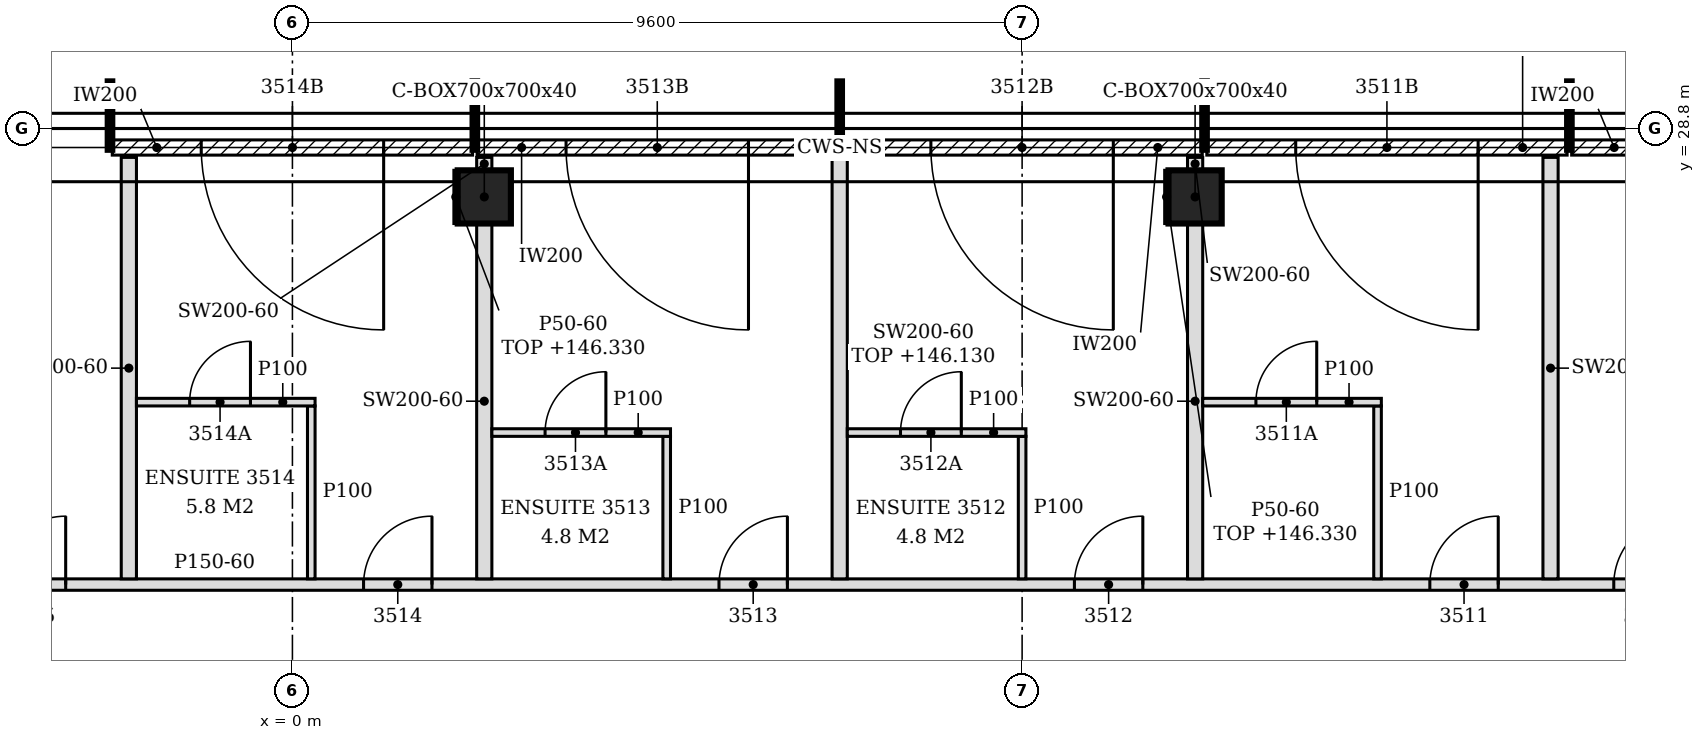
"""IFC4 building model, lengths in metres.
Left out: names, types, materials, properties, quantities, classifications, styles, units other than length and angle.
Written with IfcOpenShell. Run it as: python <this file> out.ifc"""

import sys

from ifc_helpers import new_model, si_unit, direction, frame, frame_2d, origin, origin_2d, place, context, subcontext, project, spatial, polyline, rectangle, hollow_rectangle, outline, extrude, element, fill, save


model = new_model("IFC4")
c1 = context("Model", 3, precision=1e-05, world=origin(), true_north=direction((0.0, 1.0)))
c2 = subcontext(c1, "Body", "Model", "MODEL_VIEW")
j1 = project(units=[si_unit("LENGTHUNIT", "METRE"), si_unit("PLANEANGLEUNIT", "RADIAN")], contexts=[c1])
p1 = place(None, origin())
s1 = spatial("IfcSite", under=j1, at=p1, CompositionType="ELEMENT")
p2 = place(p1, origin())
s2 = spatial("IfcBuilding", under=s1, at=p2, CompositionType="ELEMENT")
p3 = place(p2, frame((0.0, 0.0, 143.4)))
s3 = spatial("IfcBuildingStorey", under=s2, at=p3, CompositionType="ELEMENT", Elevation=143.4)
for number, where, z_axis, x_axis in (
    (1, (11.876, 27.9, -0.15), (0.0, 0.0, 1.0), (1.0, 0.0, 0.0)),
    (2, (2.524, 27.9, -0.15), (0.0, 0.0, 1.0), (1.0, 0.0, 0.0)),
):
    element("IfcColumn", number, at=place(p3, frame(where, z_axis=z_axis, x_axis=x_axis)), inside=s3, PredefinedType="COLUMN", context=c2, shape_type="SweptSolid", body=[
        extrude(hollow_rectangle(XDim=0.7, YDim=0.7, WallThickness=0.04, at=origin_2d()), origin(), (0.0, 0.0, 1.0), 3.6),
    ])
p4 = place(p3, frame((21.457, 28.55, 0.0), z_axis=(0.0, 0.0, 1.0), x_axis=(-1.0, 0.0, 0.0)))
e3 = element("IfcWall", 3, at=p4, inside=s3, PredefinedType="NOTDEFINED", context=c2, shape_type="SweptSolid", body=[
    extrude(rectangle(XDim=4.626, YDim=0.2, at=frame_2d((2.313, 0.0))), origin(), (0.0, 0.0, 1.0), 3.45),
])
p5 = place(p4, frame((1.108, 0.0, 0.0)))
e4 = element("IfcOpeningElement", 4, at=p5, cuts=e3, PredefinedType="OPENING", context=c2, shape_type="SweptSolid", body=[
    extrude(rectangle(XDim=2.4, YDim=2.4, at=frame_2d((1.2, 1.2))), frame((0.0, 0.11, 0.0), z_axis=(0.0, -1.0, 0.0), x_axis=(1.0, 0.0, 0.0)), (0.0, 0.0, 1.0), 0.22),
])
p6 = place(p3, frame((16.77, 28.55, 0.0), z_axis=(0.0, 0.0, 1.0), x_axis=(-1.0, 0.0, 0.0)))
e5 = element("IfcWall", 5, at=p6, inside=s3, PredefinedType="NOTDEFINED", context=c2, shape_type="SweptSolid", body=[
    extrude(rectangle(XDim=4.74, YDim=0.2, at=frame_2d((2.37, 0.0))), origin(), (0.0, 0.0, 1.0), 3.45),
])
p7 = place(p6, frame((1.17, 0.0, 0.0)))
e6 = element("IfcOpeningElement", 6, at=p7, cuts=e5, PredefinedType="OPENING", context=c2, shape_type="SweptSolid", body=[
    extrude(rectangle(XDim=2.4, YDim=2.4, at=frame_2d((1.2, 1.2))), frame((0.0, 0.11, 0.0), z_axis=(0.0, -1.0, 0.0), x_axis=(1.0, 0.0, 0.0)), (0.0, 0.0, 1.0), 0.22),
])
p8 = place(p3, frame((11.97, 28.55, 0.0), z_axis=(0.0, 0.0, 1.0), x_axis=(-1.0, 0.0, 0.0)))
e7 = element("IfcWall", 7, at=p8, inside=s3, PredefinedType="NOTDEFINED", context=c2, shape_type="SweptSolid", body=[
    extrude(rectangle(XDim=4.74, YDim=0.2, at=frame_2d((2.37, 0.0))), origin(), (0.0, 0.0, 1.0), 3.45),
])
p9 = place(p8, frame((1.17, 0.0, 0.0)))
e8 = element("IfcOpeningElement", 8, at=p9, cuts=e7, PredefinedType="OPENING", context=c2, shape_type="SweptSolid", body=[
    extrude(rectangle(XDim=2.4, YDim=2.4, at=frame_2d((1.2, 1.2))), frame((0.0, 0.11, 0.0), z_axis=(0.0, -1.0, 0.0), x_axis=(1.0, 0.0, 0.0)), (0.0, 0.0, 1.0), 0.22),
])
p10 = place(p3, frame((7.17, 28.55, 0.0), z_axis=(0.0, 0.0, 1.0), x_axis=(-1.0, 0.0, 0.0)))
e9 = element("IfcWall", 9, at=p10, inside=s3, PredefinedType="NOTDEFINED", context=c2, shape_type="SweptSolid", body=[
    extrude(rectangle(XDim=4.74, YDim=0.2, at=frame_2d((2.37, 0.0))), origin(), (0.0, 0.0, 1.0), 3.45),
])
p11 = place(p10, frame((1.17, 0.0, 0.0)))
e10 = element("IfcOpeningElement", 10, at=p11, cuts=e9, PredefinedType="OPENING", context=c2, shape_type="SweptSolid", body=[
    extrude(rectangle(XDim=2.4, YDim=2.4, at=frame_2d((1.2, 1.2))), frame((0.0, 0.11, 0.0), z_axis=(0.0, -1.0, 0.0), x_axis=(1.0, 0.0, 0.0)), (0.0, 0.0, 1.0), 0.22),
])
p12 = place(p3, frame((2.37, 28.55, 0.0), z_axis=(0.0, 0.0, 1.0), x_axis=(-1.0, 0.0, 0.0)))
e11 = element("IfcWall", 11, at=p12, inside=s3, PredefinedType="NOTDEFINED", context=c2, shape_type="SweptSolid", body=[
    extrude(rectangle(XDim=4.74, YDim=0.2, at=frame_2d((2.37, 0.0))), origin(), (0.0, 0.0, 1.0), 3.45),
])
p13 = place(p12, frame((1.17, 0.0, 0.0)))
e12 = element("IfcOpeningElement", 12, at=p13, cuts=e11, PredefinedType="OPENING", context=c2, shape_type="SweptSolid", body=[
    extrude(rectangle(XDim=2.4, YDim=2.4, at=frame_2d((1.2, 1.2))), frame((0.0, 0.11, 0.0), z_axis=(0.0, -1.0, 0.0), x_axis=(1.0, 0.0, 0.0)), (0.0, 0.0, 1.0), 0.22),
])
p14 = place(p3, frame((-4.821, 22.8, 0.0), z_axis=(0.0, 0.0, 1.0), x_axis=(1.0, 0.0, 0.0)))
e13 = element("IfcWall", 13, at=p14, inside=s3, PredefinedType="PARTITIONING", context=c2, shape_type="SweptSolid", body=[
    extrude(outline(polyline([(0.0, 0.0), (24.042, 0.0), (24.042, 2.73), (23.871, 2.73), (23.869, 3.45), (12.171, 3.45), (12.169, 2.73), (11.871, 2.73), (11.869, 3.45), (0.171, 3.45), (0.169, 2.73), (0.0, 2.73), (0.0, 0.0)])), frame((0.0, 0.075, 0.0), z_axis=(0.0, -1.0, 0.0), x_axis=(1.0, 0.0, 0.0)), (0.0, 0.0, 1.0), 0.15),
])
p15 = place(p14, frame((22.205, 0.0, 0.0)))
e14 = element("IfcOpeningElement", 14, at=p15, cuts=e13, PredefinedType="OPENING", context=c2, shape_type="SweptSolid", body=[
    extrude(rectangle(XDim=0.9, YDim=2.1, at=frame_2d((0.45, 1.05))), frame((0.0, 0.085, 0.0), z_axis=(0.0, -1.0, 0.0), x_axis=(1.0, 0.0, 0.0)), (0.0, 0.0, 1.0), 0.17),
])
p16 = place(p14, frame((19.785, 0.0, 0.0)))
e15 = element("IfcOpeningElement", 15, at=p16, cuts=e13, PredefinedType="OPENING", context=c2, shape_type="SweptSolid", body=[
    extrude(rectangle(XDim=0.9, YDim=2.1, at=frame_2d((0.45, 1.05))), frame((0.0, 0.085, 0.0), z_axis=(0.0, -1.0, 0.0), x_axis=(1.0, 0.0, 0.0)), (0.0, 0.0, 1.0), 0.17),
])
p17 = place(p14, frame((15.109, 0.0, 0.0)))
e16 = element("IfcOpeningElement", 16, at=p17, cuts=e13, PredefinedType="OPENING", context=c2, shape_type="SweptSolid", body=[
    extrude(rectangle(XDim=0.9, YDim=2.1, at=frame_2d((0.45, 1.05))), frame((0.0, 0.085, 0.0), z_axis=(0.0, -1.0, 0.0), x_axis=(1.0, 0.0, 0.0)), (0.0, 0.0, 1.0), 0.17),
])
p18 = place(p14, frame((10.433, 0.0, 0.0)))
e17 = element("IfcOpeningElement", 17, at=p18, cuts=e13, PredefinedType="OPENING", context=c2, shape_type="SweptSolid", body=[
    extrude(rectangle(XDim=0.9, YDim=2.1, at=frame_2d((0.45, 1.05))), frame((0.0, 0.085, 0.0), z_axis=(0.0, -1.0, 0.0), x_axis=(1.0, 0.0, 0.0)), (0.0, 0.0, 1.0), 0.17),
])
p19 = place(p14, frame((5.757, 0.0, 0.0)))
e18 = element("IfcOpeningElement", 18, at=p19, cuts=e13, PredefinedType="OPENING", context=c2, shape_type="SweptSolid", body=[
    extrude(rectangle(XDim=0.9, YDim=2.1, at=frame_2d((0.45, 1.05))), frame((0.0, 0.085, 0.0), z_axis=(0.0, -1.0, 0.0), x_axis=(1.0, 0.0, 0.0)), (0.0, 0.0, 1.0), 0.17),
])
p20 = place(p14, frame((0.938, 0.0, 0.0)))
e19 = element("IfcOpeningElement", 19, at=p20, cuts=e13, PredefinedType="OPENING", context=c2, shape_type="SweptSolid", body=[
    extrude(rectangle(XDim=0.9, YDim=2.1, at=frame_2d((0.45, 1.05))), frame((0.0, 0.085, 0.0), z_axis=(0.0, -1.0, 0.0), x_axis=(1.0, 0.0, 0.0)), (0.0, 0.0, 1.0), 0.17),
])
p21 = place(p3, frame((-2.152, 22.875, 0.0), z_axis=(0.0, 0.0, 1.0), x_axis=(0.0, 1.0, 0.0)))
e20 = element("IfcWall", 20, at=p21, inside=s3, PredefinedType="PARTITIONING", context=c2, shape_type="SweptSolid", body=[
    extrude(outline(polyline([(0.0, 0.0), (5.545, 0.0), (5.545, 3.45), (5.175, 3.45), (5.173, 2.93), (4.875, 2.93), (4.873, 3.45), (1.23, 3.45), (1.228, 2.88), (1.02, 2.88), (1.018, 3.45), (0.0, 3.45), (0.0, 0.0)])), frame((0.0, 0.1, 0.0), z_axis=(0.0, -1.0, 0.0), x_axis=(1.0, 0.0, 0.0)), (0.0, 0.0, 1.0), 0.2),
])
p22 = place(p3, frame((0.248, 22.875, 0.0), z_axis=(0.0, 0.0, 1.0), x_axis=(0.0, 1.0, 0.0)))
e21 = element("IfcWall", 21, at=p22, inside=s3, PredefinedType="PARTITIONING", context=c2, shape_type="SweptSolid", body=[
    extrude(outline(polyline([(0.0, 0.0), (2.275, 0.0), (2.275, 3.45), (1.23, 3.45), (1.228, 2.88), (1.02, 2.88), (1.018, 3.45), (0.0, 3.45), (0.0, 0.0)])), frame((0.0, 0.05, 0.0), z_axis=(0.0, -1.0, 0.0), x_axis=(1.0, 0.0, 0.0)), (0.0, 0.0, 1.0), 0.1),
])
p23 = place(p3, frame((2.524, 22.875, 0.0), z_axis=(0.0, 0.0, 1.0), x_axis=(0.0, 1.0, 0.0)))
e22 = element("IfcWall", 22, at=p23, inside=s3, PredefinedType="PARTITIONING", context=c2, shape_type="SweptSolid", body=[
    extrude(outline(polyline([(0.0, 0.0), (4.675, 0.0), (4.675, 3.45), (1.23, 3.45), (1.228, 2.88), (1.02, 2.88), (1.018, 3.45), (0.0, 3.45), (0.0, 0.0)])), frame((0.0, 0.1, 0.0), z_axis=(0.0, -1.0, 0.0), x_axis=(1.0, 0.0, 0.0)), (0.0, 0.0, 1.0), 0.2),
])
p24 = place(p3, frame((4.924, 22.875, 0.0), z_axis=(0.0, 0.0, 1.0), x_axis=(0.0, 1.0, 0.0)))
e23 = element("IfcWall", 23, at=p24, inside=s3, PredefinedType="PARTITIONING", context=c2, shape_type="SweptSolid", body=[
    extrude(outline(polyline([(0.0, 0.0), (1.875, 0.0), (1.875, 3.45), (1.23, 3.45), (1.228, 2.88), (1.02, 2.88), (1.018, 3.45), (0.0, 3.45), (0.0, 0.0)])), frame((0.0, 0.05, 0.0), z_axis=(0.0, -1.0, 0.0), x_axis=(1.0, 0.0, 0.0)), (0.0, 0.0, 1.0), 0.1),
])
p25 = place(p3, frame((7.2, 22.875, 0.0), z_axis=(0.0, 0.0, 1.0), x_axis=(0.0, 1.0, 0.0)))
e24 = element("IfcWall", 24, at=p25, inside=s3, PredefinedType="PARTITIONING", context=c2, shape_type="SweptSolid", body=[
    extrude(rectangle(XDim=5.575, YDim=0.2, at=frame_2d((2.788, 0.0))), origin(), (0.0, 0.0, 1.0), 2.73),
])
p26 = place(p3, frame((9.6, 22.875, 0.0), z_axis=(0.0, 0.0, 1.0), x_axis=(0.0, 1.0, 0.0)))
e25 = element("IfcWall", 25, at=p26, inside=s3, PredefinedType="PARTITIONING", context=c2, shape_type="SweptSolid", body=[
    extrude(outline(polyline([(0.0, 0.0), (1.875, 0.0), (1.875, 3.45), (1.23, 3.45), (1.228, 2.88), (1.02, 2.88), (1.018, 3.45), (0.0, 3.45), (0.0, 0.0)])), frame((0.0, 0.05, 0.0), z_axis=(0.0, -1.0, 0.0), x_axis=(1.0, 0.0, 0.0)), (0.0, 0.0, 1.0), 0.1),
])
p27 = place(p3, frame((11.876, 22.875, 0.0), z_axis=(0.0, 0.0, 1.0), x_axis=(0.0, 1.0, 0.0)))
e26 = element("IfcWall", 26, at=p27, inside=s3, PredefinedType="PARTITIONING", context=c2, shape_type="SweptSolid", body=[
    extrude(outline(polyline([(0.0, 0.0), (4.675, 0.0), (4.675, 3.45), (1.23, 3.45), (1.228, 2.88), (1.02, 2.88), (1.018, 3.45), (0.0, 3.45), (0.0, 0.0)])), frame((0.0, 0.1, 0.0), z_axis=(0.0, -1.0, 0.0), x_axis=(1.0, 0.0, 0.0)), (0.0, 0.0, 1.0), 0.2),
])
p28 = place(p3, frame((14.276, 22.875, 0.0), z_axis=(0.0, 0.0, 1.0), x_axis=(0.0, 1.0, 0.0)))
e27 = element("IfcWall", 27, at=p28, inside=s3, PredefinedType="PARTITIONING", context=c2, shape_type="SweptSolid", body=[
    extrude(outline(polyline([(0.0, 0.0), (2.275, 0.0), (2.275, 3.45), (1.23, 3.45), (1.228, 2.88), (1.02, 2.88), (1.018, 3.45), (0.0, 3.45), (0.0, 0.0)])), frame((0.0, 0.05, 0.0), z_axis=(0.0, -1.0, 0.0), x_axis=(1.0, 0.0, 0.0)), (0.0, 0.0, 1.0), 0.1),
])
p29 = place(p3, frame((16.552, 22.875, 0.0), z_axis=(0.0, 0.0, 1.0), x_axis=(0.0, 1.0, 0.0)))
e28 = element("IfcWall", 28, at=p29, inside=s3, PredefinedType="PARTITIONING", context=c2, shape_type="SweptSolid", body=[
    extrude(outline(polyline([(0.0, 0.0), (5.545, 0.0), (5.545, 3.45), (5.175, 3.45), (5.173, 2.93), (4.875, 2.93), (4.873, 3.45), (1.23, 3.45), (1.228, 2.88), (1.02, 2.88), (1.018, 3.45), (0.0, 3.45), (0.0, 0.0)])), frame((0.0, 0.1, 0.0), z_axis=(0.0, -1.0, 0.0), x_axis=(1.0, 0.0, 0.0)), (0.0, 0.0, 1.0), 0.2),
])
p30 = place(p3, frame((2.624, 24.8, 0.0), z_axis=(0.0, 0.0, 1.0), x_axis=(1.0, 0.0, 0.0)))
e29 = element("IfcWall", 29, at=p30, inside=s3, PredefinedType="PARTITIONING", context=c2, shape_type="SweptSolid", body=[
    extrude(rectangle(XDim=2.35, YDim=0.1, at=frame_2d((1.175, 0.0))), origin(), (0.0, 0.0, 1.0), 3.45),
])
p31 = place(p30, frame((0.7, 0.0, 0.0)))
e30 = element("IfcOpeningElement", 30, at=p31, cuts=e29, PredefinedType="OPENING", context=c2, shape_type="SweptSolid", body=[
    extrude(rectangle(XDim=0.8, YDim=2.1, at=frame_2d((0.4, 1.05))), frame((0.0, 0.06, 0.0), z_axis=(0.0, -1.0, 0.0), x_axis=(1.0, 0.0, 0.0)), (0.0, 0.0, 1.0), 0.12),
])
p32 = place(p3, frame((7.3, 24.8, 0.0), z_axis=(0.0, 0.0, 1.0), x_axis=(1.0, 0.0, 0.0)))
e31 = element("IfcWall", 31, at=p32, inside=s3, PredefinedType="PARTITIONING", context=c2, shape_type="SweptSolid", body=[
    extrude(outline(polyline([(0.0, 0.0), (2.35, 0.0), (2.35, 3.45), (0.05, 3.45), (0.048, 2.73), (0.0, 2.73), (0.0, 0.0)])), frame((0.0, 0.05, 0.0), z_axis=(0.0, -1.0, 0.0), x_axis=(1.0, 0.0, 0.0)), (0.0, 0.0, 1.0), 0.1),
])
p33 = place(p32, frame((0.7, 0.0, 0.0)))
e32 = element("IfcOpeningElement", 32, at=p33, cuts=e31, PredefinedType="OPENING", context=c2, shape_type="SweptSolid", body=[
    extrude(rectangle(XDim=0.8, YDim=2.1, at=frame_2d((0.4, 1.05))), frame((0.0, 0.06, 0.0), z_axis=(0.0, -1.0, 0.0), x_axis=(1.0, 0.0, 0.0)), (0.0, 0.0, 1.0), 0.12),
])
p34 = place(p3, frame((-2.052, 25.2, 0.0), z_axis=(0.0, 0.0, 1.0), x_axis=(1.0, 0.0, 0.0)))
e33 = element("IfcWall", 33, at=p34, inside=s3, PredefinedType="PARTITIONING", context=c2, shape_type="SweptSolid", body=[
    extrude(rectangle(XDim=2.35, YDim=0.1, at=frame_2d((1.175, 0.0))), origin(), (0.0, 0.0, 1.0), 3.45),
])
p35 = place(p34, frame((0.7, 0.0, 0.0)))
e34 = element("IfcOpeningElement", 34, at=p35, cuts=e33, PredefinedType="OPENING", context=c2, shape_type="SweptSolid", body=[
    extrude(rectangle(XDim=0.8, YDim=2.1, at=frame_2d((0.4, 1.05))), frame((0.0, 0.06, 0.0), z_axis=(0.0, -1.0, 0.0), x_axis=(1.0, 0.0, 0.0)), (0.0, 0.0, 1.0), 0.12),
])
p36 = place(p3, frame((11.976, 25.2, 0.0), z_axis=(0.0, 0.0, 1.0), x_axis=(1.0, 0.0, 0.0)))
e35 = element("IfcWall", 35, at=p36, inside=s3, PredefinedType="PARTITIONING", context=c2, shape_type="SweptSolid", body=[
    extrude(rectangle(XDim=2.35, YDim=0.1, at=frame_2d((1.175, 0.0))), origin(), (0.0, 0.0, 1.0), 3.45),
])
p37 = place(p36, frame((0.7, 0.0, 0.0)))
e36 = element("IfcOpeningElement", 36, at=p37, cuts=e35, PredefinedType="OPENING", context=c2, shape_type="SweptSolid", body=[
    extrude(rectangle(XDim=0.8, YDim=2.1, at=frame_2d((0.4, 1.05))), frame((0.0, 0.06, 0.0), z_axis=(0.0, -1.0, 0.0), x_axis=(1.0, 0.0, 0.0)), (0.0, 0.0, 1.0), 0.12),
])
for number, where, z_axis, x_axis in (
    (37, (2.524, 28.25, 0.0), (0.0, 0.0, 1.0), (0.0, 1.0, 0.0)),
    (38, (11.876, 28.25, 0.0), (0.0, 0.0, 1.0), (0.0, 1.0, 0.0)),
):
    element("IfcWall", number, at=place(p3, frame(where, z_axis=z_axis, x_axis=x_axis)), inside=s3, PredefinedType="PARTITIONING", context=c2, shape_type="SweptSolid", body=[
        extrude(rectangle(XDim=0.17, YDim=0.2, at=frame_2d((0.085, 0.0))), origin(), (0.0, 0.0, 1.0), 3.45),
    ])
for number, where, z_axis, x_axis in (
    (39, (2.149, 27.55, 0.0), (0.0, 0.0, 1.0), (0.0, 1.0, 0.0)),
    (40, (11.501, 27.55, 0.0), (0.0, 0.0, 1.0), (0.0, 1.0, 0.0)),
):
    element("IfcWall", number, at=place(p3, frame(where, z_axis=z_axis, x_axis=x_axis)), inside=s3, PredefinedType="PARTITIONING", context=c2, shape_type="SweptSolid", body=[
        extrude(rectangle(XDim=0.7, YDim=0.05, at=frame_2d((0.35, 0.0))), origin(), (0.0, 0.0, 1.0), 2.93),
    ])
p38 = place(p7, origin())
e41 = element("IfcDoor", 41, at=p38, inside=s3, OperationType="SINGLE_SWING_LEFT", PredefinedType="DOOR", context=c2, shape_type="SweptSolid", body=[
    extrude(rectangle(XDim=2.4, YDim=2.4, at=frame_2d((1.2, 1.2))), frame((0.0, 0.025, 0.0), z_axis=(0.0, -1.0, 0.0), x_axis=(1.0, 0.0, 0.0)), (0.0, 0.0, 1.0), 0.05),
])
fill(e6, e41)
p39 = place(p9, origin())
e42 = element("IfcDoor", 42, at=p39, inside=s3, OperationType="SINGLE_SWING_LEFT", PredefinedType="DOOR", context=c2, shape_type="SweptSolid", body=[
    extrude(rectangle(XDim=2.4, YDim=2.4, at=frame_2d((1.2, 1.2))), frame((0.0, 0.025, 0.0), z_axis=(0.0, -1.0, 0.0), x_axis=(1.0, 0.0, 0.0)), (0.0, 0.0, 1.0), 0.05),
])
fill(e8, e42)
p40 = place(p11, origin())
e43 = element("IfcDoor", 43, at=p40, inside=s3, OperationType="SINGLE_SWING_LEFT", PredefinedType="DOOR", context=c2, shape_type="SweptSolid", body=[
    extrude(rectangle(XDim=2.4, YDim=2.4, at=frame_2d((1.2, 1.2))), frame((0.0, 0.025, 0.0), z_axis=(0.0, -1.0, 0.0), x_axis=(1.0, 0.0, 0.0)), (0.0, 0.0, 1.0), 0.05),
])
fill(e10, e43)
p41 = place(p13, origin())
e44 = element("IfcDoor", 44, at=p41, inside=s3, OperationType="SINGLE_SWING_LEFT", PredefinedType="DOOR", context=c2, shape_type="SweptSolid", body=[
    extrude(rectangle(XDim=2.4, YDim=2.4, at=frame_2d((1.2, 1.2))), frame((0.0, 0.025, 0.0), z_axis=(0.0, -1.0, 0.0), x_axis=(1.0, 0.0, 0.0)), (0.0, 0.0, 1.0), 0.05),
])
fill(e12, e44)
p42 = place(p15, origin())
e45 = element("IfcDoor", 45, at=p42, inside=s3, OperationType="SINGLE_SWING_RIGHT", PredefinedType="DOOR", context=c2, shape_type="SweptSolid", body=[
    extrude(rectangle(XDim=0.9, YDim=2.1, at=frame_2d((0.45, 1.05))), frame((0.0, 0.025, 0.0), z_axis=(0.0, -1.0, 0.0), x_axis=(1.0, 0.0, 0.0)), (0.0, 0.0, 1.0), 0.05),
])
fill(e14, e45)
p43 = place(p16, origin())
e46 = element("IfcDoor", 46, at=p43, inside=s3, OperationType="SINGLE_SWING_RIGHT", PredefinedType="DOOR", context=c2, shape_type="SweptSolid", body=[
    extrude(rectangle(XDim=0.9, YDim=2.1, at=frame_2d((0.45, 1.05))), frame((0.0, 0.025, 0.0), z_axis=(0.0, -1.0, 0.0), x_axis=(1.0, 0.0, 0.0)), (0.0, 0.0, 1.0), 0.05),
])
fill(e15, e46)
p44 = place(p37, origin())
e47 = element("IfcDoor", 47, at=p44, inside=s3, OperationType="SINGLE_SWING_RIGHT", PredefinedType="DOOR", context=c2, shape_type="SweptSolid", body=[
    extrude(rectangle(XDim=0.8, YDim=2.1, at=frame_2d((0.4, 1.05))), frame((0.0, 0.025, 0.0), z_axis=(0.0, -1.0, 0.0), x_axis=(1.0, 0.0, 0.0)), (0.0, 0.0, 1.0), 0.05),
])
fill(e36, e47)
p45 = place(p17, origin())
e48 = element("IfcDoor", 48, at=p45, inside=s3, OperationType="SINGLE_SWING_RIGHT", PredefinedType="DOOR", context=c2, shape_type="SweptSolid", body=[
    extrude(rectangle(XDim=0.9, YDim=2.1, at=frame_2d((0.45, 1.05))), frame((0.0, 0.025, 0.0), z_axis=(0.0, -1.0, 0.0), x_axis=(1.0, 0.0, 0.0)), (0.0, 0.0, 1.0), 0.05),
])
fill(e16, e48)
p46 = place(p33, origin())
e49 = element("IfcDoor", 49, at=p46, inside=s3, OperationType="SINGLE_SWING_RIGHT", PredefinedType="DOOR", context=c2, shape_type="SweptSolid", body=[
    extrude(rectangle(XDim=0.8, YDim=2.1, at=frame_2d((0.4, 1.05))), frame((0.0, 0.025, 0.0), z_axis=(0.0, -1.0, 0.0), x_axis=(1.0, 0.0, 0.0)), (0.0, 0.0, 1.0), 0.05),
])
fill(e32, e49)
p47 = place(p18, origin())
e50 = element("IfcDoor", 50, at=p47, inside=s3, OperationType="SINGLE_SWING_RIGHT", PredefinedType="DOOR", context=c2, shape_type="SweptSolid", body=[
    extrude(rectangle(XDim=0.9, YDim=2.1, at=frame_2d((0.45, 1.05))), frame((0.0, 0.025, 0.0), z_axis=(0.0, -1.0, 0.0), x_axis=(1.0, 0.0, 0.0)), (0.0, 0.0, 1.0), 0.05),
])
fill(e17, e50)
p48 = place(p31, origin())
e51 = element("IfcDoor", 51, at=p48, inside=s3, OperationType="SINGLE_SWING_RIGHT", PredefinedType="DOOR", context=c2, shape_type="SweptSolid", body=[
    extrude(rectangle(XDim=0.8, YDim=2.1, at=frame_2d((0.4, 1.05))), frame((0.0, 0.025, 0.0), z_axis=(0.0, -1.0, 0.0), x_axis=(1.0, 0.0, 0.0)), (0.0, 0.0, 1.0), 0.05),
])
fill(e30, e51)
p49 = place(p19, origin())
e52 = element("IfcDoor", 52, at=p49, inside=s3, OperationType="SINGLE_SWING_RIGHT", PredefinedType="DOOR", context=c2, shape_type="SweptSolid", body=[
    extrude(rectangle(XDim=0.9, YDim=2.1, at=frame_2d((0.45, 1.05))), frame((0.0, 0.025, 0.0), z_axis=(0.0, -1.0, 0.0), x_axis=(1.0, 0.0, 0.0)), (0.0, 0.0, 1.0), 0.05),
])
fill(e18, e52)
p50 = place(p35, origin())
e53 = element("IfcDoor", 53, at=p50, inside=s3, OperationType="SINGLE_SWING_RIGHT", PredefinedType="DOOR", context=c2, shape_type="SweptSolid", body=[
    extrude(rectangle(XDim=0.8, YDim=2.1, at=frame_2d((0.4, 1.05))), frame((0.0, 0.025, 0.0), z_axis=(0.0, -1.0, 0.0), x_axis=(1.0, 0.0, 0.0)), (0.0, 0.0, 1.0), 0.05),
])
fill(e34, e53)
p51 = place(p20, origin())
e54 = element("IfcDoor", 54, at=p51, inside=s3, OperationType="SINGLE_SWING_RIGHT", PredefinedType="DOOR", context=c2, shape_type="SweptSolid", body=[
    extrude(rectangle(XDim=0.9, YDim=2.1, at=frame_2d((0.45, 1.05))), frame((0.0, 0.025, 0.0), z_axis=(0.0, -1.0, 0.0), x_axis=(1.0, 0.0, 0.0)), (0.0, 0.0, 1.0), 0.05),
])
fill(e19, e54)
save(model, sys.argv[1])
